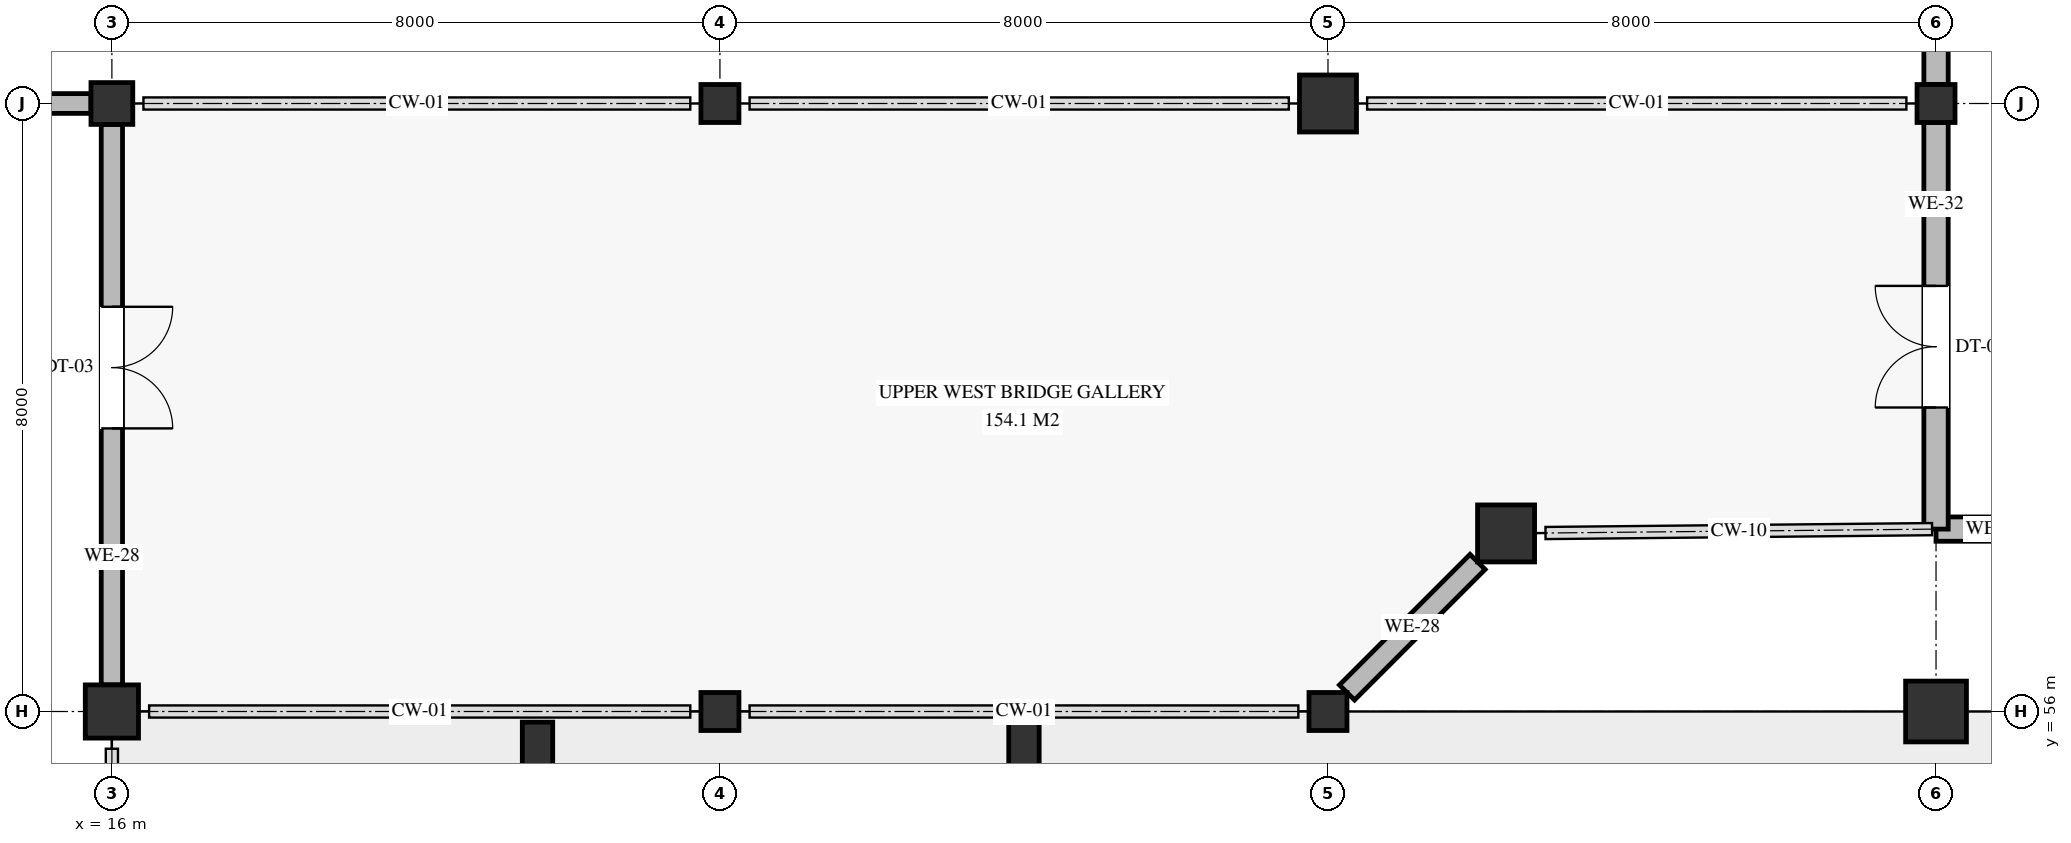
"""IFC4 building model, lengths in metres.
Left out: names, types, materials, properties, quantities, classifications, styles, units other than length and angle.
Written with IfcOpenShell. Run it as: python <this file> out.ifc"""

import sys

from ifc_helpers import new_model, si_unit, direction, frame, frame_2d, origin, origin_2d, place, context, subcontext, project, spatial, rectangle, circle, extrude, element, fill, save


model = new_model("IFC4")
c1 = context("Model", 3, precision=1e-05, world=origin(), true_north=direction((0.0, 1.0)))
c2 = subcontext(c1, "Body", "Model", "MODEL_VIEW")
j1 = project(units=[si_unit("LENGTHUNIT", "METRE"), si_unit("PLANEANGLEUNIT", "RADIAN")], contexts=[c1])
p1 = place(None, origin())
s1 = spatial("IfcSite", under=j1, at=p1, CompositionType="ELEMENT")
p2 = place(p1, origin())
s2 = spatial("IfcBuilding", under=s1, at=p2, CompositionType="ELEMENT")
p3 = place(p2, frame((0.0, 0.0, 4.8)))
s3 = spatial("IfcBuildingStorey", under=s2, at=p3, CompositionType="ELEMENT", Elevation=4.8)
p4 = place(p3, frame((40.0, 56.0, 0.0), z_axis=(0.0, 0.0, 1.0), x_axis=(1.0, 0.0, 0.0)))
e1 = element("IfcColumn", 1, at=p4, inside=s3, PredefinedType="COLUMN", context=c2, shape_type="SweptSolid", body=[
    extrude(rectangle(XDim=0.8, YDim=0.8, at=origin_2d()), origin(), (0.0, 0.0, 1.0), 4.8),
])
for number, where, z_axis, x_axis in (
    (2, (34.343, 58.343, 0.0), (0.0, 0.0, 1.0), (1.0, 0.0, 0.0)),
    (3, (32.0, 64.0, 0.0), (0.0, 0.0, 1.0), (1.0, 0.0, 0.0)),
):
    element("IfcColumn", number, at=place(p3, frame(where, z_axis=z_axis, x_axis=x_axis)), inside=s3, PredefinedType="COLUMN", context=c2, shape_type="SweptSolid", body=[
        extrude(circle(Radius=0.375, at=origin_2d()), origin(), (0.0, 0.0, 1.0), 4.8),
    ])
p5 = place(p3, frame((16.0, 56.0, 0.0), z_axis=(0.0, 0.0, 1.0), x_axis=(1.0, 0.0, 0.0)))
e4 = element("IfcColumn", 4, at=p5, inside=s3, PredefinedType="COLUMN", context=c2, shape_type="SweptSolid", body=[
    extrude(rectangle(XDim=0.7, YDim=0.7, at=origin_2d()), origin(), (0.0, 0.0, 1.0), 4.8),
])
p6 = place(p3, frame((16.0, 64.0, 0.0), z_axis=(0.0, 0.0, 1.0), x_axis=(1.0, 0.0, 0.0)))
e5 = element("IfcColumn", 5, at=p6, inside=s3, PredefinedType="COLUMN", context=c2, shape_type="SweptSolid", body=[
    extrude(rectangle(XDim=0.55, YDim=0.55, at=origin_2d()), origin(), (0.0, 0.0, 1.0), 4.8),
])
for number, where, z_axis, x_axis in (
    (6, (24.0, 56.0, 0.0), (0.0, 0.0, 1.0), (1.0, 0.0, 0.0)),
    (7, (24.0, 64.0, 0.0), (0.0, 0.0, 1.0), (1.0, 0.0, 0.0)),
    (8, (32.0, 56.0, 0.0), (0.0, 0.0, 1.0), (1.0, 0.0, 0.0)),
):
    element("IfcColumn", number, at=place(p3, frame(where, z_axis=z_axis, x_axis=x_axis)), inside=s3, PredefinedType="COLUMN", context=c2, shape_type="SweptSolid", body=[
        extrude(rectangle(XDim=0.5, YDim=0.5, at=origin_2d()), origin(), (0.0, 0.0, 1.0), 4.8),
    ])
for number, where, z_axis, x_axis in (
    (9, (21.6, 55.56, 0.0), (0.0, 0.0, 1.0), (1.0, 0.0, 0.0)),
    (10, (28.0, 55.56, 0.0), (0.0, 0.0, 1.0), (1.0, 0.0, 0.0)),
):
    element("IfcColumn", number, at=place(p3, frame(where, z_axis=z_axis, x_axis=x_axis)), inside=s3, PredefinedType="PILASTER", context=c2, shape_type="SweptSolid", body=[
        extrude(rectangle(XDim=0.4, YDim=0.6, at=origin_2d()), origin(), (0.0, 0.0, 1.0), 4.8),
    ])
p7 = place(p3, frame((40.0, 64.0, 0.0), z_axis=(0.0, 0.0, 1.0), x_axis=(1.0, 0.0, 0.0)))
e11 = element("IfcColumn", 11, at=p7, inside=s3, PredefinedType="COLUMN", context=c2, shape_type="SweptSolid", body=[
    extrude(rectangle(XDim=0.5, YDim=0.5, at=origin_2d()), origin(), (0.0, 0.0, 1.0), 4.8),
])
p8 = place(p3, frame((48.0, 58.4, 0.0), z_axis=(0.0, 0.0, 1.0), x_axis=(-1.0, 0.0, 0.0)))
e12 = element("IfcWall", 12, at=p8, inside=s3, PredefinedType="STANDARD", context=c2, shape_type="SweptSolid", body=[
    extrude(rectangle(XDim=8.0, YDim=0.32, at=frame_2d((4.0, 0.0))), origin(), (0.0, 0.0, 1.0), 4.475),
])
p9 = place(p8, frame((1.395, 0.0, 0.75)))
e13 = element("IfcOpeningElement", 13, at=p9, cuts=e12, PredefinedType="OPENING", context=c2, shape_type="SweptSolid", body=[
    extrude(rectangle(XDim=1.05, YDim=2.5, at=frame_2d((0.525, 1.25))), frame((0.0, 0.17, 0.0), z_axis=(0.0, -1.0, 0.0), x_axis=(1.0, 0.0, 0.0)), (0.0, 0.0, 1.0), 0.34),
])
p10 = place(p8, frame((3.575, 0.0, 0.75)))
e14 = element("IfcOpeningElement", 14, at=p10, cuts=e12, PredefinedType="OPENING", context=c2, shape_type="SweptSolid", body=[
    extrude(rectangle(XDim=0.85, YDim=2.4, at=frame_2d((0.425, 1.2))), frame((0.0, 0.17, 0.0), z_axis=(0.0, -1.0, 0.0), x_axis=(1.0, 0.0, 0.0)), (0.0, 0.0, 1.0), 0.34),
])
p11 = place(p8, frame((5.68, 0.0, 0.75)))
e15 = element("IfcOpeningElement", 15, at=p11, cuts=e12, PredefinedType="OPENING", context=c2, shape_type="SweptSolid", body=[
    extrude(rectangle(XDim=0.8, YDim=2.05, at=frame_2d((0.4, 1.025))), frame((0.0, 0.17, 0.0), z_axis=(0.0, -1.0, 0.0), x_axis=(1.0, 0.0, 0.0)), (0.0, 0.0, 1.0), 0.34),
])
p12 = place(p3, frame((40.0, 58.4, 0.0), z_axis=(0.0, 0.0, 1.0), x_axis=(0.0, 1.0, 0.0)))
e16 = element("IfcWall", 16, at=p12, inside=s3, PredefinedType="STANDARD", context=c2, shape_type="SweptSolid", body=[
    extrude(rectangle(XDim=5.35, YDim=0.32, at=frame_2d((2.675, 0.0))), origin(), (0.0, 0.0, 1.0), 3.548),
])
p13 = place(p12, frame((1.6, 0.0, 0.0)))
e17 = element("IfcOpeningElement", 17, at=p13, cuts=e16, PredefinedType="OPENING", context=c2, shape_type="SweptSolid", body=[
    extrude(rectangle(XDim=1.6, YDim=2.4, at=frame_2d((0.8, 1.2))), frame((0.0, 0.17, 0.0), z_axis=(0.0, -1.0, 0.0), x_axis=(1.0, 0.0, 0.0)), (0.0, 0.0, 1.0), 0.34),
])
p14 = place(p3, frame((40.0, 64.25, 0.0), z_axis=(0.0, 0.0, 1.0), x_axis=(0.0, 1.0, 0.0)))
e18 = element("IfcWall", 18, at=p14, inside=s3, PredefinedType="STANDARD", context=c2, shape_type="SweptSolid", body=[
    extrude(rectangle(XDim=5.35, YDim=0.32, at=frame_2d((2.675, 0.0))), origin(), (0.0, 0.0, 1.0), 3.548),
])
p15 = place(p14, frame((1.115, 0.0, 0.8)))
e19 = element("IfcOpeningElement", 19, at=p15, cuts=e18, PredefinedType="OPENING", context=c2, shape_type="SweptSolid", body=[
    extrude(rectangle(XDim=0.98, YDim=2.15, at=frame_2d((0.49, 1.075))), frame((0.0, 0.17, 0.0), z_axis=(0.0, -1.0, 0.0), x_axis=(1.0, 0.0, 0.0)), (0.0, 0.0, 1.0), 0.34),
])
p16 = place(p14, frame((2.809, 0.0, 0.8)))
e20 = element("IfcOpeningElement", 20, at=p16, cuts=e18, PredefinedType="OPENING", context=c2, shape_type="SweptSolid", body=[
    extrude(rectangle(XDim=1.872, YDim=1.65, at=frame_2d((0.936, 0.825))), frame((0.0, 0.17, 0.0), z_axis=(0.0, -1.0, 0.0), x_axis=(1.0, 0.0, 0.0)), (0.0, 0.0, 1.0), 0.34),
])
p17 = place(p3, frame((16.0, 63.725, 0.0), z_axis=(0.0, 0.0, 1.0), x_axis=(0.0, -1.0, 0.0)))
e21 = element("IfcWall", 21, at=p17, inside=s3, PredefinedType="STANDARD", context=c2, shape_type="SweptSolid", body=[
    extrude(rectangle(XDim=7.375, YDim=0.28, at=frame_2d((3.688, 0.0))), origin(), (0.0, 0.0, 1.0), 3.924),
])
p18 = place(p17, frame((2.4, 0.0, 0.0)))
e22 = element("IfcOpeningElement", 22, at=p18, cuts=e21, PredefinedType="OPENING", context=c2, shape_type="SweptSolid", body=[
    extrude(rectangle(XDim=1.6, YDim=2.4, at=frame_2d((0.8, 1.2))), frame((0.0, 0.15, 0.0), z_axis=(0.0, -1.0, 0.0), x_axis=(1.0, 0.0, 0.0)), (0.0, 0.0, 1.0), 0.3),
])
p19 = place(p3, frame((0.275, 64.0, 0.0), z_axis=(0.0, 0.0, 1.0), x_axis=(1.0, 0.0, 0.0)))
e23 = element("IfcWall", 23, at=p19, inside=s3, PredefinedType="STANDARD", context=c2, shape_type="SweptSolid", body=[
    extrude(rectangle(XDim=15.45, YDim=0.26, at=frame_2d((7.725, 0.0))), origin(), (0.0, 0.0, 1.0), 3.64),
])
p20 = place(p19, frame((3.308, 0.0, 0.75)))
e24 = element("IfcOpeningElement", 24, at=p20, cuts=e23, PredefinedType="OPENING", context=c2, shape_type="SweptSolid", body=[
    extrude(rectangle(XDim=0.8, YDim=2.05, at=frame_2d((0.4, 1.025))), frame((0.0, 0.14, 0.0), z_axis=(0.0, -1.0, 0.0), x_axis=(1.0, 0.0, 0.0)), (0.0, 0.0, 1.0), 0.28),
])
p21 = place(p19, frame((7.15, 0.0, 0.75)))
e25 = element("IfcOpeningElement", 25, at=p21, cuts=e23, PredefinedType="OPENING", context=c2, shape_type="SweptSolid", body=[
    extrude(rectangle(XDim=1.15, YDim=2.0, at=frame_2d((0.575, 1.0))), frame((0.0, 0.14, 0.0), z_axis=(0.0, -1.0, 0.0), x_axis=(1.0, 0.0, 0.0)), (0.0, 0.0, 1.0), 0.28),
])
p22 = place(p3, frame((33.968, 57.968, 0.0), z_axis=(0.0, 0.0, 1.0), x_axis=(-0.707106781187, -0.707106781187, 0.0)))
e26 = element("IfcWall", 26, at=p22, inside=s3, PredefinedType="STANDARD", context=c2, shape_type="SweptSolid", body=[
    extrude(rectangle(XDim=2.43, YDim=0.28, at=frame_2d((1.215, 0.0))), origin(), (0.0, 0.0, 1.0), 4.475),
])
p23 = place(p13, origin())
e27 = element("IfcDoor", 27, at=p23, inside=s3, OperationType="DOUBLE_DOOR_SINGLE_SWING", PredefinedType="DOOR", context=c2, shape_type="SweptSolid", body=[
    extrude(rectangle(XDim=1.6, YDim=2.4, at=frame_2d((0.8, 1.2))), frame((0.0, 0.025, 0.0), z_axis=(0.0, -1.0, 0.0), x_axis=(1.0, 0.0, 0.0)), (0.0, 0.0, 1.0), 0.05),
])
fill(e17, e27)
p24 = place(p18, origin())
e28 = element("IfcDoor", 28, at=p24, inside=s3, OperationType="DOUBLE_DOOR_SINGLE_SWING", PredefinedType="DOOR", context=c2, shape_type="SweptSolid", body=[
    extrude(rectangle(XDim=1.6, YDim=2.4, at=frame_2d((0.8, 1.2))), frame((0.0, 0.025, 0.0), z_axis=(0.0, -1.0, 0.0), x_axis=(1.0, 0.0, 0.0)), (0.0, 0.0, 1.0), 0.05),
])
fill(e22, e28)
save(model, sys.argv[1])
